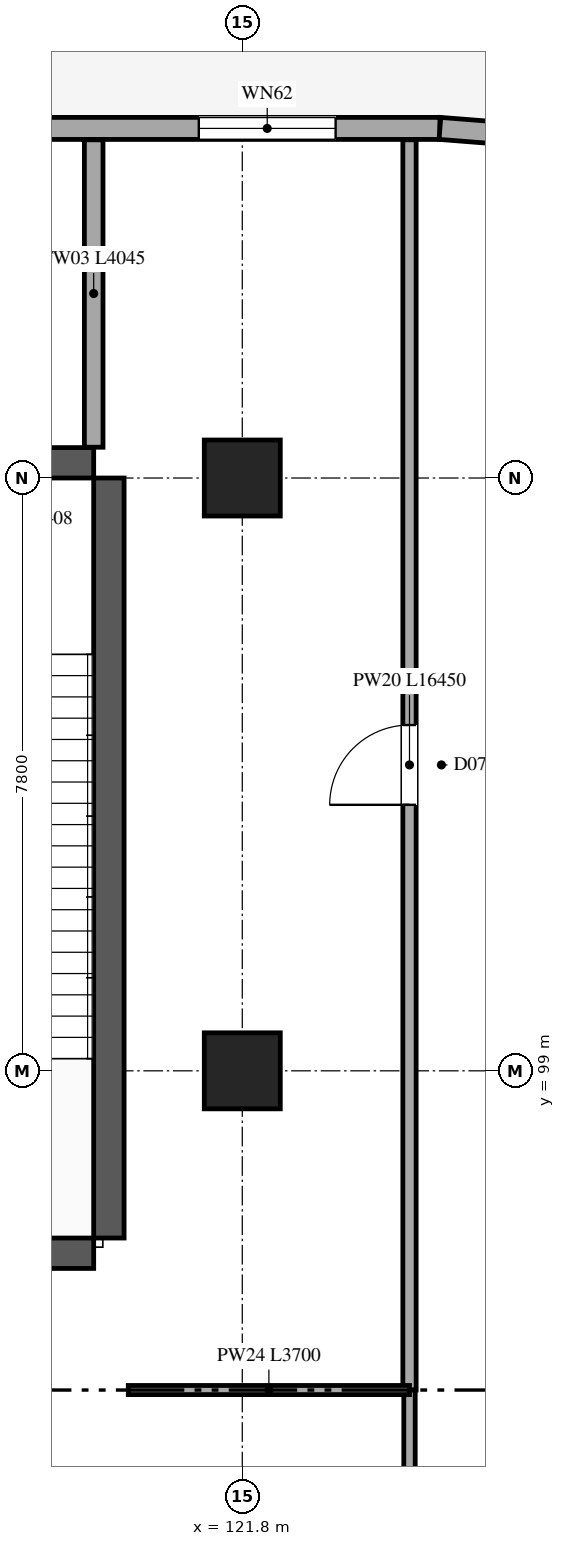
"""IFC4 building model, lengths in metres.
Left out: names, types, materials, properties, quantities, classifications, styles, units other than length and angle.
Written with IfcOpenShell. Run it as: python <this file> out.ifc"""

import sys

from ifc_helpers import new_model, si_unit, direction, frame, frame_2d, origin, origin_2d, place, context, subcontext, project, spatial, rectangle, extrude, element, fill, save


model = new_model("IFC4")
c1 = context("Model", 3, precision=1e-05, world=origin(), true_north=direction((0.0, 1.0)))
c2 = subcontext(c1, "Body", "Model", "MODEL_VIEW")
j1 = project(units=[si_unit("LENGTHUNIT", "METRE"), si_unit("PLANEANGLEUNIT", "RADIAN")], contexts=[c1])
p1 = place(None, origin())
s1 = spatial("IfcSite", under=j1, at=p1, CompositionType="ELEMENT")
p2 = place(p1, origin())
s2 = spatial("IfcBuilding", under=s1, at=p2, CompositionType="ELEMENT")
p3 = place(p2, origin())
s3 = spatial("IfcBuildingStorey", under=s2, at=p3, CompositionType="ELEMENT", Elevation=0.0)
for number, where, z_axis, x_axis in (
    (1, (121.8, 99.0, 0.0), (0.0, 0.0, 1.0), (1.0, 0.0, 0.0)),
    (2, (121.8, 106.8, 0.0), (0.0, 0.0, 1.0), (1.0, 0.0, 0.0)),
):
    element("IfcColumn", number, at=place(p3, frame(where, z_axis=z_axis, x_axis=x_axis)), inside=s3, PredefinedType="COLUMN", context=c2, shape_type="SweptSolid", body=[
        extrude(rectangle(XDim=1.0, YDim=1.0, at=origin_2d()), origin(), (0.0, 0.0, 1.0), 6.0),
    ])
p4 = place(p3, frame((117.735, 111.4, 0.0), z_axis=(0.0, 0.0, 1.0), x_axis=(1.0, 0.0, 0.0)))
e3 = element("IfcWall", 3, at=p4, inside=s3, PredefinedType="STANDARD", context=c2, shape_type="SweptSolid", body=[
    extrude(rectangle(XDim=6.665, YDim=0.29, at=frame_2d((3.333, 0.0))), origin(), (0.0, 0.0, 1.0), 4.92),
])
p5 = place(p4, frame((3.493, 0.0, 0.85)))
e4 = element("IfcOpeningElement", 4, at=p5, cuts=e3, PredefinedType="OPENING", context=c2, shape_type="SweptSolid", body=[
    extrude(rectangle(XDim=1.8, YDim=1.6, at=frame_2d((0.9, 0.8))), frame((0.0, 0.155, 0.0), z_axis=(0.0, -1.0, 0.0), x_axis=(1.0, 0.0, 0.0)), (0.0, 0.0, 1.0), 0.31),
])
p6 = place(p3, frame((124.4, 111.4, 0.0), z_axis=(0.0, 0.0, 1.0), x_axis=(0.99691631769, -0.078472004713, 0.0)))
e5 = element("IfcWall", 5, at=p6, inside=s3, PredefinedType="STANDARD", context=c2, shape_type="SweptSolid", body=[
    extrude(rectangle(XDim=3.186, YDim=0.29, at=frame_2d((1.593, 0.0))), origin(), (0.0, 0.0, 1.0), 5.66),
])
p7 = place(p6, frame((0.693, 0.0, 0.85)))
e6 = element("IfcOpeningElement", 6, at=p7, cuts=e5, PredefinedType="OPENING", context=c2, shape_type="SweptSolid", body=[
    extrude(rectangle(XDim=1.8, YDim=1.6, at=frame_2d((0.9, 0.8))), frame((0.0, 0.155, 0.0), z_axis=(0.0, -1.0, 0.0), x_axis=(1.0, 0.0, 0.0)), (0.0, 0.0, 1.0), 0.31),
])
p8 = place(p3, frame((120.045, 106.8, 0.0), z_axis=(0.0, 0.0, 1.0), x_axis=(0.0, -1.0, 0.0)))
e7 = element("IfcWall", 7, at=p8, inside=s3, PredefinedType="SHEAR", context=c2, shape_type="SweptSolid", body=[
    extrude(rectangle(XDim=10.0, YDim=0.4, at=frame_2d((5.0, 0.0))), origin(), (0.0, 0.0, 1.0), 6.0),
])
p9 = place(p3, frame((119.845, 96.6, 0.0), z_axis=(0.0, 0.0, 1.0), x_axis=(-1.0, 0.0, 0.0)))
e8 = element("IfcWall", 8, at=p9, inside=s3, PredefinedType="SHEAR", context=c2, shape_type="SweptSolid", body=[
    extrude(rectangle(XDim=4.79, YDim=0.4, at=frame_2d((2.395, 0.0))), origin(), (0.0, 0.0, 1.0), 6.0),
])
p10 = place(p3, frame((115.055, 107.0, 0.0), z_axis=(0.0, 0.0, 1.0), x_axis=(1.0, 0.0, 0.0)))
e9 = element("IfcWall", 9, at=p10, inside=s3, PredefinedType="SHEAR", context=c2, shape_type="SweptSolid", body=[
    extrude(rectangle(XDim=4.79, YDim=0.4, at=frame_2d((2.395, 0.0))), origin(), (0.0, 0.0, 1.0), 6.0),
])
p11 = place(p10, frame((1.645, 0.0, 0.0)))
e10 = element("IfcOpeningElement", 10, at=p11, cuts=e9, PredefinedType="OPENING", context=c2, shape_type="SweptSolid", body=[
    extrude(rectangle(XDim=1.5, YDim=2.2, at=frame_2d((0.75, 1.1))), frame((0.0, 0.21, 0.0), z_axis=(0.0, -1.0, 0.0), x_axis=(1.0, 0.0, 0.0)), (0.0, 0.0, 1.0), 0.42),
])
p12 = place(p3, frame((119.845, 111.25, 0.0), z_axis=(0.0, 0.0, 1.0), x_axis=(0.0, -1.0, 0.0)))
e11 = element("IfcWall", 11, at=p12, inside=s3, PredefinedType="STANDARD", context=c2, shape_type="SweptSolid", body=[
    extrude(rectangle(XDim=4.045, YDim=0.245, at=frame_2d((2.022, 0.0))), origin(), (0.0, 0.0, 1.0), 5.66),
])
p13 = place(p3, frame((124.0, 94.8, 0.0), z_axis=(0.0, 0.0, 1.0), x_axis=(0.0, 1.0, 0.0)))
e12 = element("IfcWall", 12, at=p13, inside=s3, PredefinedType="PARTITIONING", context=c2, shape_type="SweptSolid", body=[
    extrude(rectangle(XDim=16.45, YDim=0.175, at=frame_2d((8.225, 0.0))), origin(), (0.0, 0.0, 1.0), 4.925),
])
p14 = place(p13, frame((7.7, 0.0, 0.0)))
e13 = element("IfcOpeningElement", 13, at=p14, cuts=e12, PredefinedType="OPENING", context=c2, shape_type="SweptSolid", body=[
    extrude(rectangle(XDim=1.05, YDim=2.2, at=frame_2d((0.525, 1.1))), frame((0.0, 0.098, 0.0), z_axis=(0.0, -1.0, 0.0), x_axis=(1.0, 0.0, 0.0)), (0.0, 0.0, 1.0), 0.195),
])
p15 = place(p3, frame((124.0, 91.4, 0.0), z_axis=(0.0, 0.0, 1.0), x_axis=(0.0, 1.0, 0.0)))
e14 = element("IfcWall", 14, at=p15, inside=s3, PredefinedType="PARTITIONING", context=c2, shape_type="SweptSolid", body=[
    extrude(rectangle(XDim=3.4, YDim=0.15, at=frame_2d((1.7, 0.0))), origin(), (0.0, 0.0, 1.0), 5.66),
])
p16 = place(p3, frame((124.0, 94.8, 0.0), z_axis=(0.0, 0.0, 1.0), x_axis=(-1.0, 0.0, 0.0)))
e15 = element("IfcWall", 15, at=p16, inside=s3, PredefinedType="PARTITIONING", context=c2, shape_type="SweptSolid", body=[
    extrude(rectangle(XDim=3.7, YDim=0.12, at=frame_2d((1.85, 0.0))), origin(), (0.0, 0.0, 1.0), 4.925),
])
p17 = place(p5, origin())
e16 = element("IfcWindow", 16, at=p17, inside=s3, PartitioningType="TRIPLE_PANEL_VERTICAL", PredefinedType="WINDOW", context=c2, shape_type="SweptSolid", body=[
    extrude(rectangle(XDim=1.8, YDim=1.6, at=frame_2d((0.9, 0.8))), frame((0.0, 0.03, 0.0), z_axis=(0.0, -1.0, 0.0), x_axis=(1.0, 0.0, 0.0)), (0.0, 0.0, 1.0), 0.06),
])
fill(e4, e16)
p18 = place(p14, origin())
e17 = element("IfcDoor", 17, at=p18, inside=s3, OperationType="SINGLE_SWING_LEFT", PredefinedType="DOOR", context=c2, shape_type="SweptSolid", body=[
    extrude(rectangle(XDim=1.05, YDim=2.2, at=frame_2d((0.525, 1.1))), frame((0.0, 0.025, 0.0), z_axis=(0.0, -1.0, 0.0), x_axis=(1.0, 0.0, 0.0)), (0.0, 0.0, 1.0), 0.05),
])
fill(e13, e17)
save(model, sys.argv[1])
